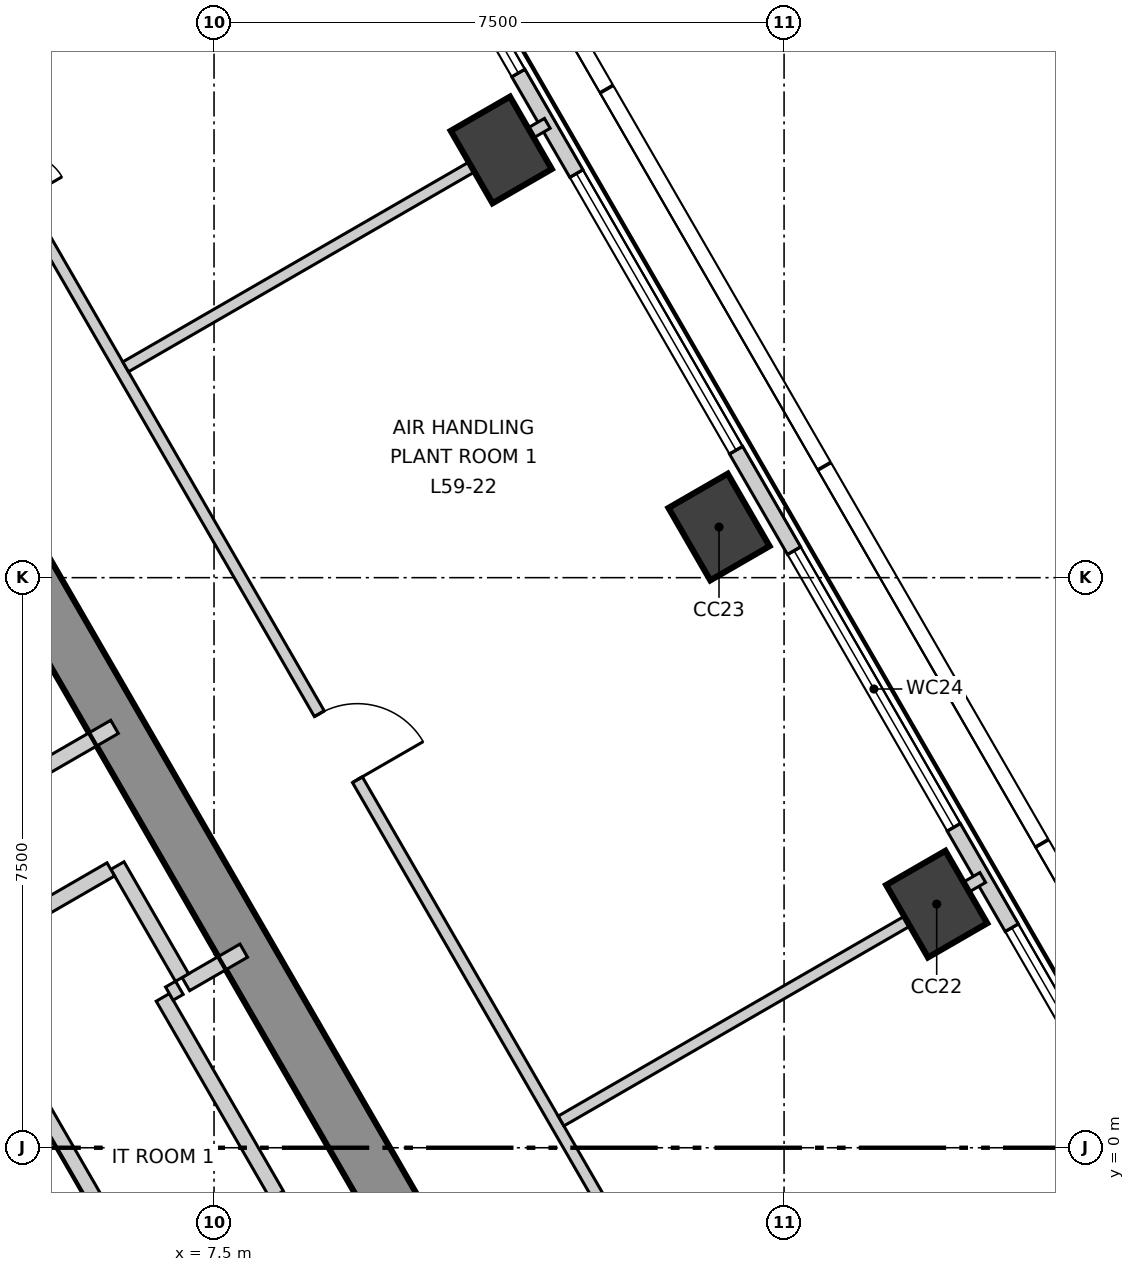
"""IFC4 building model, lengths in metres.
Left out: names, types, materials, properties, quantities, classifications, styles, units other than length and angle.
Written with IfcOpenShell. Run it as: python <this file> out.ifc"""

import sys

from ifc_helpers import new_model, si_unit, direction, frame, frame_2d, origin, origin_2d, place, context, subcontext, project, spatial, polyline, rectangle, outline, extrude, element, fill, save


model = new_model("IFC4")
c1 = context("Model", 3, precision=1e-05, world=origin(), true_north=direction((0.0, 1.0)))
c2 = subcontext(c1, "Body", "Model", "MODEL_VIEW")
j1 = project(units=[si_unit("LENGTHUNIT", "METRE"), si_unit("PLANEANGLEUNIT", "RADIAN")], contexts=[c1])
p1 = place(None, origin())
s1 = spatial("IfcSite", under=j1, at=p1, CompositionType="ELEMENT")
p2 = place(p1, origin())
s2 = spatial("IfcBuilding", under=s1, at=p2, CompositionType="ELEMENT")
p3 = place(p2, frame((0.0, 0.0, 251.3)))
s3 = spatial("IfcBuildingStorey", under=s2, at=p3, CompositionType="ELEMENT", Elevation=251.3)
p4 = place(p3, frame((12.413, -5.2, -0.3), z_axis=(0.0, 0.0, 1.0), x_axis=(-0.500011533395, 0.866018744874, 0.0)))
e1 = element("IfcWall", 1, at=p4, inside=s3, PredefinedType="SHEAR", context=c2, shape_type="SweptSolid", body=[
    extrude(outline(polyline([(-0.202, -0.35), (1.782, -0.35), (3.766, -0.35), (5.75, -0.35), (7.734, -0.35), (9.718, -0.35), (11.702, -0.35), (13.686, -0.35), (15.67, -0.35), (17.654, -0.35), (19.638, -0.35), (21.622, -0.35), (21.218, 0.35), (19.307, 0.35), (17.397, 0.35), (15.486, 0.35), (13.576, 0.35), (11.665, 0.35), (9.755, 0.35), (7.844, 0.35), (5.934, 0.35), (4.023, 0.35), (2.113, 0.35), (0.202, 0.35), (-0.202, -0.35)])), origin(), (0.0, 0.0, 1.0), 4.2),
])
p5 = place(p4, frame((4.055, 0.0, 0.3)))
e2 = element("IfcOpeningElement", 2, at=p5, cuts=e1, PredefinedType="OPENING", context=c2, shape_type="SweptSolid", body=[
    extrude(rectangle(XDim=0.9, YDim=2.1, at=frame_2d((0.45, 1.05))), frame((0.0, 0.36, 0.0), z_axis=(0.0, -1.0, 0.0), x_axis=(1.0, 0.0, 0.0)), (0.0, 0.0, 1.0), 0.72),
])
p6 = place(p4, frame((16.465, 0.0, 0.3)))
e3 = element("IfcOpeningElement", 3, at=p6, cuts=e1, PredefinedType="OPENING", context=c2, shape_type="SweptSolid", body=[
    extrude(rectangle(XDim=0.9, YDim=2.1, at=frame_2d((0.45, 1.05))), frame((0.0, 0.36, 0.0), z_axis=(0.0, -1.0, 0.0), x_axis=(1.0, 0.0, 0.0)), (0.0, 0.0, 1.0), 0.72),
])
for number, where, z_axis, x_axis in (
    (4, (17.008, 3.205, -0.3), (0.0, 0.0, 1.0), (-0.5, 0.866, 0.0)),
    (5, (14.144, 8.166, -0.3), (0.0, 0.0, 1.0), (-0.5, 0.866, 0.0)),
    (6, (11.279, 13.127, -0.3), (0.0, 0.0, 1.0), (-0.5, 0.866, 0.0)),
):
    element("IfcColumn", number, at=place(p3, frame(where, z_axis=z_axis, x_axis=x_axis)), inside=s3, PredefinedType="COLUMN", context=c2, shape_type="SweptSolid", body=[
        extrude(rectangle(XDim=1.1, YDim=0.9, at=origin_2d()), origin(), (0.0, 0.0, 1.0), 4.2),
    ])
p7 = place(p3, frame((26.859, -12.457, 0.0), z_axis=(0.0, 0.0, 1.0), x_axis=(-0.500004868955, 0.866022592674, 0.0)))
e7 = element("IfcWall", 7, at=p7, inside=s3, PredefinedType="ELEMENTEDWALL", context=c2, shape_type="SweptSolid", body=[
    extrude(rectangle(XDim=48.416, YDim=0.2, at=frame_2d((24.208, 0.0))), origin(), (0.0, 0.0, 1.0), 3.9),
])
p8 = place(p7, frame((2.067, 0.0, 0.9)))
e8 = element("IfcOpeningElement", 8, at=p8, cuts=e7, PredefinedType="OPENING", context=c2, shape_type="SweptSolid", body=[
    extrude(rectangle(XDim=4.2, YDim=2.5, at=frame_2d((2.1, 1.25))), frame((0.0, 0.11, 0.0), z_axis=(0.0, -1.0, 0.0), x_axis=(1.0, 0.0, 0.0)), (0.0, 0.0, 1.0), 0.22),
])
p9 = place(p7, frame((7.796, 0.0, 0.9)))
e9 = element("IfcOpeningElement", 9, at=p9, cuts=e7, PredefinedType="OPENING", context=c2, shape_type="SweptSolid", body=[
    extrude(rectangle(XDim=4.2, YDim=2.5, at=frame_2d((2.1, 1.25))), frame((0.0, 0.11, 0.0), z_axis=(0.0, -1.0, 0.0), x_axis=(1.0, 0.0, 0.0)), (0.0, 0.0, 1.0), 0.22),
])
p10 = place(p7, frame((13.525, 0.0, 0.9)))
e10 = element("IfcOpeningElement", 10, at=p10, cuts=e7, PredefinedType="OPENING", context=c2, shape_type="SweptSolid", body=[
    extrude(rectangle(XDim=4.2, YDim=2.5, at=frame_2d((2.1, 1.25))), frame((0.0, 0.11, 0.0), z_axis=(0.0, -1.0, 0.0), x_axis=(1.0, 0.0, 0.0)), (0.0, 0.0, 1.0), 0.22),
])
p11 = place(p7, frame((19.253, 0.0, 0.9)))
e11 = element("IfcOpeningElement", 11, at=p11, cuts=e7, PredefinedType="OPENING", context=c2, shape_type="SweptSolid", body=[
    extrude(rectangle(XDim=4.2, YDim=2.5, at=frame_2d((2.1, 1.25))), frame((0.0, 0.11, 0.0), z_axis=(0.0, -1.0, 0.0), x_axis=(1.0, 0.0, 0.0)), (0.0, 0.0, 1.0), 0.22),
])
p12 = place(p7, frame((24.982, 0.0, 0.9)))
e12 = element("IfcOpeningElement", 12, at=p12, cuts=e7, PredefinedType="OPENING", context=c2, shape_type="SweptSolid", body=[
    extrude(rectangle(XDim=4.2, YDim=2.5, at=frame_2d((2.1, 1.25))), frame((0.0, 0.11, 0.0), z_axis=(0.0, -1.0, 0.0), x_axis=(1.0, 0.0, 0.0)), (0.0, 0.0, 1.0), 0.22),
])
p13 = place(p7, frame((30.711, 0.0, 0.9)))
e13 = element("IfcOpeningElement", 13, at=p13, cuts=e7, PredefinedType="OPENING", context=c2, shape_type="SweptSolid", body=[
    extrude(rectangle(XDim=4.2, YDim=2.5, at=frame_2d((2.1, 1.25))), frame((0.0, 0.11, 0.0), z_axis=(0.0, -1.0, 0.0), x_axis=(1.0, 0.0, 0.0)), (0.0, 0.0, 1.0), 0.22),
])
p14 = place(p7, frame((36.44, 0.0, 0.9)))
e14 = element("IfcOpeningElement", 14, at=p14, cuts=e7, PredefinedType="OPENING", context=c2, shape_type="SweptSolid", body=[
    extrude(rectangle(XDim=4.2, YDim=2.5, at=frame_2d((2.1, 1.25))), frame((0.0, 0.11, 0.0), z_axis=(0.0, -1.0, 0.0), x_axis=(1.0, 0.0, 0.0)), (0.0, 0.0, 1.0), 0.22),
])
p15 = place(p7, frame((42.168, 0.0, 0.9)))
e15 = element("IfcOpeningElement", 15, at=p15, cuts=e7, PredefinedType="OPENING", context=c2, shape_type="SweptSolid", body=[
    extrude(rectangle(XDim=4.2, YDim=2.5, at=frame_2d((2.1, 1.25))), frame((0.0, 0.11, 0.0), z_axis=(0.0, -1.0, 0.0), x_axis=(1.0, 0.0, 0.0)), (0.0, 0.0, 1.0), 0.22),
])
p16 = place(p3, frame((3.132, 15.675, 0.0), z_axis=(0.0, 0.0, 1.0), x_axis=(0.499994246357, -0.866028725626, 0.0)))
e16 = element("IfcWall", 16, at=p16, inside=s3, PredefinedType="PARTITIONING", context=c2, shape_type="SweptSolid", body=[
    extrude(rectangle(XDim=24.104, YDim=0.15, at=frame_2d((12.052, 0.0))), origin(), (0.0, 0.0, 1.0), 3.9),
])
p17 = place(p16, frame((20.321, 0.0, 0.0)))
e17 = element("IfcOpeningElement", 17, at=p17, cuts=e16, PredefinedType="OPENING", context=c2, shape_type="SweptSolid", body=[
    extrude(rectangle(XDim=1.2, YDim=2.1, at=frame_2d((0.6, 1.05))), frame((0.0, 0.085, 0.0), z_axis=(0.0, -1.0, 0.0), x_axis=(1.0, 0.0, 0.0)), (0.0, 0.0, 1.0), 0.17),
])
p18 = place(p16, frame((11.508, 0.0, 0.0)))
e18 = element("IfcOpeningElement", 18, at=p18, cuts=e16, PredefinedType="OPENING", context=c2, shape_type="SweptSolid", body=[
    extrude(rectangle(XDim=1.0, YDim=2.1, at=frame_2d((0.5, 1.05))), frame((0.0, 0.085, 0.0), z_axis=(0.0, -1.0, 0.0), x_axis=(1.0, 0.0, 0.0)), (0.0, 0.0, 1.0), 0.17),
])
p19 = place(p16, frame((2.497, 0.0, 0.0)))
e19 = element("IfcOpeningElement", 19, at=p19, cuts=e16, PredefinedType="OPENING", context=c2, shape_type="SweptSolid", body=[
    extrude(rectangle(XDim=1.2, YDim=2.1, at=frame_2d((0.6, 1.05))), frame((0.0, 0.085, 0.0), z_axis=(0.0, -1.0, 0.0), x_axis=(1.0, 0.0, 0.0)), (0.0, 0.0, 1.0), 0.17),
])
for number, where, z_axis, x_axis in (
    (20, (6.337, 10.274, 0.0), (0.0, 0.0, 1.0), (0.866, 0.5, 0.0)),
    (21, (12.066, 0.352, 0.0), (0.0, 0.0, 1.0), (0.866, 0.5, 0.0)),
):
    element("IfcWall", number, at=place(p3, frame(where, z_axis=z_axis, x_axis=x_axis)), inside=s3, PredefinedType="PARTITIONING", context=c2, shape_type="SweptSolid", body=[
        extrude(rectangle(XDim=6.406, YDim=0.15, at=frame_2d((3.203, 0.0))), origin(), (0.0, 0.0, 1.0), 3.9),
    ])
p20 = place(p3, frame((1.578, 2.874, 0.0), z_axis=(0.0, 0.0, 1.0), x_axis=(0.866045911672, 0.499964477614, 0.0)))
e22 = element("IfcWall", 22, at=p20, inside=s3, PredefinedType="SOLIDWALL", context=c2, shape_type="SweptSolid", body=[
    extrude(rectangle(XDim=5.327, YDim=0.2, at=frame_2d((2.663, 0.0))), origin(), (0.0, 0.0, 1.0), 3.9),
])
p21 = place(p20, frame((2.496, 0.0, 0.0)))
e23 = element("IfcOpeningElement", 23, at=p21, cuts=e22, PredefinedType="OPENING", context=c2, shape_type="SweptSolid", body=[
    extrude(rectangle(XDim=1.1, YDim=2.1, at=frame_2d((0.55, 1.05))), frame((0.0, 0.11, 0.0), z_axis=(0.0, -1.0, 0.0), x_axis=(1.0, 0.0, 0.0)), (0.0, 0.0, 1.0), 0.22),
])
p22 = place(p3, frame((7.129, 2.153, 0.0), z_axis=(0.0, 0.0, 1.0), x_axis=(0.866083962871, 0.499898558967, 0.0)))
e24 = element("IfcWall", 24, at=p22, inside=s3, PredefinedType="SOLIDWALL", context=c2, shape_type="SweptSolid", body=[
    extrude(rectangle(XDim=0.88, YDim=0.2, at=frame_2d((0.44, 0.0))), origin(), (0.0, 0.0, 1.0), 3.9),
])
p23 = place(p3, frame((5.057, 0.841, 0.0), z_axis=(0.0, 0.0, 1.0), x_axis=(0.499990139034, -0.866031096941, 0.0)))
e25 = element("IfcWall", 25, at=p23, inside=s3, PredefinedType="SOLIDWALL", context=c2, shape_type="SweptSolid", body=[
    extrude(rectangle(XDim=3.0, YDim=0.2, at=frame_2d((1.5, 0.0))), origin(), (0.0, 0.0, 1.0), 3.9),
])
p24 = place(p3, frame((6.229, 3.712, 0.0), z_axis=(0.0, 0.0, 1.0), x_axis=(0.499875724984, -0.86609714211, 0.0)))
e26 = element("IfcWall", 26, at=p24, inside=s3, PredefinedType="SOLIDWALL", context=c2, shape_type="SweptSolid", body=[
    extrude(rectangle(XDim=1.701, YDim=0.2, at=frame_2d((0.85, 0.0))), origin(), (0.0, 0.0, 1.0), 3.9),
])
p25 = place(p3, frame((2.548, 1.587, 0.0), z_axis=(0.0, 0.0, 1.0), x_axis=(0.866004344652, 0.500036473714, 0.0)))
e27 = element("IfcWall", 27, at=p25, inside=s3, PredefinedType="SOLIDWALL", context=c2, shape_type="SweptSolid", body=[
    extrude(rectangle(XDim=4.15, YDim=0.2, at=frame_2d((2.075, 0.0))), origin(), (0.0, 0.0, 1.0), 3.9),
])
p26 = place(p25, frame((1.675, 0.0, 0.0)))
e28 = element("IfcOpeningElement", 28, at=p26, cuts=e27, PredefinedType="OPENING", context=c2, shape_type="SweptSolid", body=[
    extrude(rectangle(XDim=0.9, YDim=2.1, at=frame_2d((0.45, 1.05))), frame((0.0, 0.11, 0.0), z_axis=(0.0, -1.0, 0.0), x_axis=(1.0, 0.0, 0.0)), (0.0, 0.0, 1.0), 0.22),
])
p27 = place(p3, frame((6.826, 1.978, 0.0), z_axis=(0.0, 0.0, 1.0), x_axis=(0.499990139034, -0.866031096941, 0.0)))
e29 = element("IfcWall", 29, at=p27, inside=s3, PredefinedType="SOLIDWALL", context=c2, shape_type="SweptSolid", body=[
    extrude(rectangle(XDim=3.0, YDim=0.2, at=frame_2d((1.5, 0.0))), origin(), (0.0, 0.0, 1.0), 3.9),
])
p28 = place(p3, frame((6.912, 2.028, 0.0), z_axis=(0.0, 0.0, 1.0), x_axis=(0.866559367082, 0.499074005857, 0.0)))
e30 = element("IfcWall", 30, at=p28, inside=s3, PredefinedType="SOLIDWALL", context=c2, shape_type="SweptSolid", body=[
    extrude(rectangle(XDim=0.152, YDim=0.2, at=frame_2d((0.076, 0.0))), origin(), (0.0, 0.0, 1.0), 3.9),
])
p29 = place(p10, origin())
e31 = element("IfcWindow", 31, at=p29, inside=s3, PartitioningType="SINGLE_PANEL", PredefinedType="WINDOW", context=c2, shape_type="SweptSolid", body=[
    extrude(rectangle(XDim=4.2, YDim=2.5, at=frame_2d((2.1, 1.25))), frame((0.0, 0.03, 0.0), z_axis=(0.0, -1.0, 0.0), x_axis=(1.0, 0.0, 0.0)), (0.0, 0.0, 1.0), 0.06),
])
fill(e10, e31)
p30 = place(p11, origin())
e32 = element("IfcWindow", 32, at=p30, inside=s3, PartitioningType="SINGLE_PANEL", PredefinedType="WINDOW", context=c2, shape_type="SweptSolid", body=[
    extrude(rectangle(XDim=4.2, YDim=2.5, at=frame_2d((2.1, 1.25))), frame((0.0, 0.03, 0.0), z_axis=(0.0, -1.0, 0.0), x_axis=(1.0, 0.0, 0.0)), (0.0, 0.0, 1.0), 0.06),
])
fill(e11, e32)
p31 = place(p12, origin())
e33 = element("IfcWindow", 33, at=p31, inside=s3, PartitioningType="SINGLE_PANEL", PredefinedType="WINDOW", context=c2, shape_type="SweptSolid", body=[
    extrude(rectangle(XDim=4.2, YDim=2.5, at=frame_2d((2.1, 1.25))), frame((0.0, 0.03, 0.0), z_axis=(0.0, -1.0, 0.0), x_axis=(1.0, 0.0, 0.0)), (0.0, 0.0, 1.0), 0.06),
])
fill(e12, e33)
p32 = place(p13, origin())
e34 = element("IfcWindow", 34, at=p32, inside=s3, PartitioningType="SINGLE_PANEL", PredefinedType="WINDOW", context=c2, shape_type="SweptSolid", body=[
    extrude(rectangle(XDim=4.2, YDim=2.5, at=frame_2d((2.1, 1.25))), frame((0.0, 0.03, 0.0), z_axis=(0.0, -1.0, 0.0), x_axis=(1.0, 0.0, 0.0)), (0.0, 0.0, 1.0), 0.06),
])
fill(e13, e34)
p33 = place(p18, origin())
e35 = element("IfcDoor", 35, at=p33, inside=s3, OperationType="SINGLE_SWING_LEFT", PredefinedType="DOOR", context=c2, shape_type="SweptSolid", body=[
    extrude(rectangle(XDim=1.0, YDim=2.1, at=frame_2d((0.5, 1.05))), frame((0.0, 0.025, 0.0), z_axis=(0.0, -1.0, 0.0), x_axis=(1.0, 0.0, 0.0)), (0.0, 0.0, 1.0), 0.05),
])
fill(e18, e35)
save(model, sys.argv[1])
